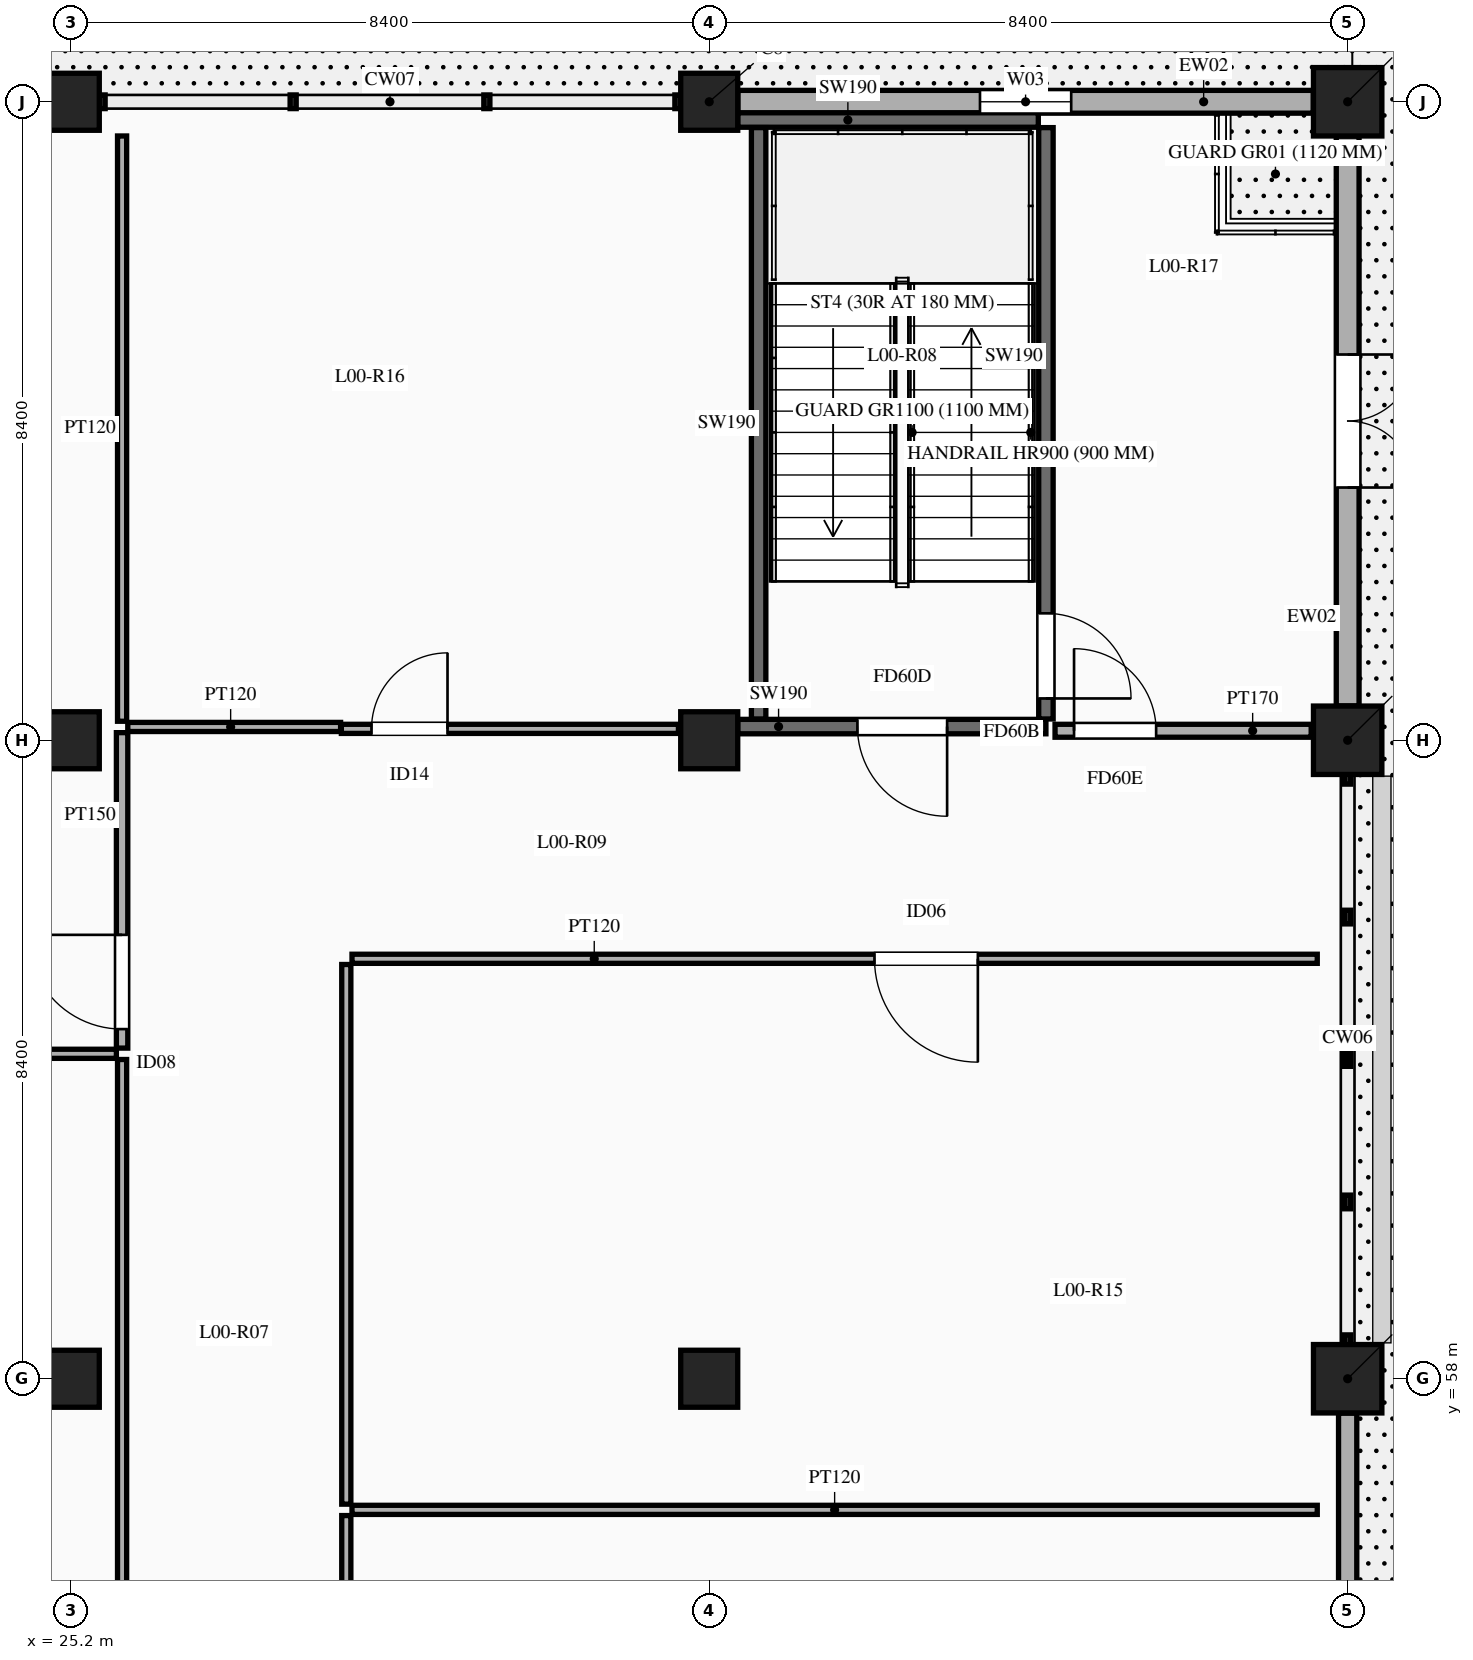
"""IFC4 building model, lengths in metres.
Left out: names, types, materials, properties, quantities, classifications, styles, units other than length and angle.
Written with IfcOpenShell. Run it as: python <this file> out.ifc"""

import sys

from ifc_helpers import new_model, si_unit, direction, frame, frame_2d, origin, origin_2d, place, context, subcontext, project, spatial, rectangle, circle, extrude, element, fill, save


model = new_model("IFC4")
c1 = context("Model", 3, precision=1e-05, world=origin(), true_north=direction((0.0, 1.0)))
c2 = subcontext(c1, "Body", "Model", "MODEL_VIEW")
j1 = project(units=[si_unit("LENGTHUNIT", "METRE"), si_unit("PLANEANGLEUNIT", "RADIAN")], contexts=[c1])
p1 = place(None, origin())
s1 = spatial("IfcSite", under=j1, at=p1, CompositionType="ELEMENT")
p2 = place(p1, origin())
s2 = spatial("IfcBuilding", under=s1, at=p2, CompositionType="ELEMENT")
p3 = place(p2, origin())
s3 = spatial("IfcBuildingStorey", under=s2, at=p3, CompositionType="ELEMENT", Elevation=0.0)
for number, where, z_axis, x_axis in (
    (1, (25.2, 58.0, 0.0), (0.0, 0.0, 1.0), (1.0, 0.0, 0.0)),
    (2, (25.2, 66.4, 0.0), (0.0, 0.0, 1.0), (1.0, 0.0, 0.0)),
    (3, (25.2, 74.8, 0.0), (0.0, 0.0, 1.0), (1.0, 0.0, 0.0)),
    (4, (33.6, 58.0, 0.0), (0.0, 0.0, 1.0), (1.0, 0.0, 0.0)),
    (5, (33.6, 66.4, 0.0), (0.0, 0.0, 1.0), (1.0, 0.0, 0.0)),
    (6, (33.6, 74.8, 0.0), (0.0, 0.0, 1.0), (1.0, 0.0, 0.0)),
):
    element("IfcColumn", number, at=place(p3, frame(where, z_axis=z_axis, x_axis=x_axis)), inside=s3, PredefinedType="COLUMN", context=c2, shape_type="SweptSolid", body=[
        extrude(rectangle(XDim=0.75, YDim=0.75, at=origin_2d()), origin(), (0.0, 0.0, 1.0), 5.4),
    ])
for number, where, z_axis, x_axis in (
    (7, (42.0, 58.0, 0.0), (0.0, 0.0, 1.0), (1.0, 0.0, 0.0)),
    (8, (42.0, 66.4, 0.0), (0.0, 0.0, 1.0), (1.0, 0.0, 0.0)),
    (9, (42.0, 74.8, 0.0), (0.0, 0.0, 1.0), (1.0, 0.0, 0.0)),
):
    element("IfcColumn", number, at=place(p3, frame(where, z_axis=z_axis, x_axis=x_axis)), inside=s3, PredefinedType="COLUMN", context=c2, shape_type="SweptSolid", body=[
        extrude(circle(Radius=0.45, at=origin_2d()), origin(), (0.0, 0.0, 1.0), 5.4),
    ])
p4 = place(p3, frame((33.977, 74.8, 0.0), z_axis=(0.0, 0.0, 1.0), x_axis=(1.0, 0.0, 0.0)))
e10 = element("IfcWall", 10, at=p4, inside=s3, PredefinedType="SOLIDWALL", context=c2, shape_type="SweptSolid", body=[
    extrude(rectangle(XDim=7.571, YDim=0.3, at=frame_2d((3.786, 0.0))), origin(), (0.0, 0.0, 1.0), 4.45),
])
p5 = place(p4, frame((3.186, 0.0, 1.1)))
e11 = element("IfcOpeningElement", 11, at=p5, cuts=e10, PredefinedType="OPENING", context=c2, shape_type="SweptSolid", body=[
    extrude(rectangle(XDim=1.2, YDim=1.2, at=frame_2d((0.6, 0.6))), frame((0.0, 0.16, 0.0), z_axis=(0.0, -1.0, 0.0), x_axis=(1.0, 0.0, 0.0)), (0.0, 0.0, 1.0), 0.32),
])
p6 = place(p3, frame((42.0, 50.052, 0.0), z_axis=(0.0, 0.0, 1.0), x_axis=(0.0, 1.0, 0.0)))
e12 = element("IfcWall", 12, at=p6, inside=s3, PredefinedType="SOLIDWALL", context=c2, shape_type="SweptSolid", body=[
    extrude(rectangle(XDim=7.496, YDim=0.24, at=frame_2d((3.748, 0.0))), origin(), (0.0, 0.0, 1.0), 4.45),
])
p7 = place(p6, frame((2.723, 0.0, 0.0)))
e13 = element("IfcOpeningElement", 13, at=p7, cuts=e12, PredefinedType="OPENING", context=c2, shape_type="SweptSolid", body=[
    extrude(rectangle(XDim=2.05, YDim=2.4, at=frame_2d((1.025, 1.2))), frame((0.0, 0.13, 0.0), z_axis=(0.0, -1.0, 0.0), x_axis=(1.0, 0.0, 0.0)), (0.0, 0.0, 1.0), 0.26),
])
p8 = place(p3, frame((42.0, 66.852, 0.0), z_axis=(0.0, 0.0, 1.0), x_axis=(0.0, 1.0, 0.0)))
e14 = element("IfcWall", 14, at=p8, inside=s3, PredefinedType="SOLIDWALL", context=c2, shape_type="SweptSolid", body=[
    extrude(rectangle(XDim=7.496, YDim=0.3, at=frame_2d((3.748, 0.0))), origin(), (0.0, 0.0, 1.0), 4.45),
])
p9 = place(p8, frame((2.873, 0.0, 0.0)))
e15 = element("IfcOpeningElement", 15, at=p9, cuts=e14, PredefinedType="OPENING", context=c2, shape_type="SweptSolid", body=[
    extrude(rectangle(XDim=1.75, YDim=2.35, at=frame_2d((0.875, 1.175))), frame((0.0, 0.16, 0.0), z_axis=(0.0, -1.0, 0.0), x_axis=(1.0, 0.0, 0.0)), (0.0, 0.0, 1.0), 0.32),
])
p10 = place(p3, frame((33.975, 66.58, 0.0), z_axis=(0.0, 0.0, 1.0), x_axis=(1.0, 0.0, 0.0)))
e16 = element("IfcWall", 16, at=p10, inside=s3, PredefinedType="SOLIDWALL", context=c2, shape_type="SweptSolid", body=[
    extrude(rectangle(XDim=4.055, YDim=0.19, at=frame_2d((2.027, 0.0))), origin(), (0.0, 0.0, 1.0), 5.2),
])
p11 = place(p10, frame((1.575, 0.0, 0.0)))
e17 = element("IfcOpeningElement", 17, at=p11, cuts=e16, PredefinedType="OPENING", context=c2, shape_type="SweptSolid", body=[
    extrude(rectangle(XDim=1.18, YDim=2.15, at=frame_2d((0.59, 1.075))), frame((0.0, 0.105, 0.0), z_axis=(0.0, -1.0, 0.0), x_axis=(1.0, 0.0, 0.0)), (0.0, 0.0, 1.0), 0.21),
])
p12 = place(p3, frame((33.975, 74.56, 0.0), z_axis=(0.0, 0.0, 1.0), x_axis=(1.0, 0.0, 0.0)))
e18 = element("IfcWall", 18, at=p12, inside=s3, PredefinedType="SOLIDWALL", context=c2, shape_type="SweptSolid", body=[
    extrude(rectangle(XDim=3.955, YDim=0.19, at=frame_2d((1.978, 0.0))), origin(), (0.0, 0.0, 1.0), 5.2),
])
p13 = place(p3, frame((34.25, 66.68, 0.0), z_axis=(0.0, 0.0, 1.0), x_axis=(0.0, 1.0, 0.0)))
e19 = element("IfcWall", 19, at=p13, inside=s3, PredefinedType="SOLIDWALL", context=c2, shape_type="SweptSolid", body=[
    extrude(rectangle(XDim=7.78, YDim=0.19, at=frame_2d((3.89, 0.0))), origin(), (0.0, 0.0, 1.0), 5.2),
])
p14 = place(p3, frame((38.03, 66.68, 0.0), z_axis=(0.0, 0.0, 1.0), x_axis=(0.0, 1.0, 0.0)))
e20 = element("IfcWall", 20, at=p14, inside=s3, PredefinedType="SOLIDWALL", context=c2, shape_type="SweptSolid", body=[
    extrude(rectangle(XDim=7.78, YDim=0.19, at=frame_2d((3.89, 0.0))), origin(), (0.0, 0.0, 1.0), 5.2),
])
p15 = place(p14, frame((0.27, 0.0, 0.0)))
e21 = element("IfcOpeningElement", 21, at=p15, cuts=e20, PredefinedType="OPENING", context=c2, shape_type="SweptSolid", body=[
    extrude(rectangle(XDim=1.12, YDim=2.15, at=frame_2d((0.56, 1.075))), frame((0.0, 0.105, 0.0), z_axis=(0.0, -1.0, 0.0), x_axis=(1.0, 0.0, 0.0)), (0.0, 0.0, 1.0), 0.21),
])
p16 = place(p3, frame((25.875, 42.55, 0.0), z_axis=(0.0, 0.0, 1.0), x_axis=(0.0, 1.0, 0.0)))
e22 = element("IfcWall", 22, at=p16, inside=s3, PredefinedType="PARTITIONING", context=c2, shape_type="SweptSolid", body=[
    extrude(rectangle(XDim=19.65, YDim=0.12, at=frame_2d((9.825, 0.0))), origin(), (0.0, 0.0, 1.0), 4.35),
])
p17 = place(p16, frame((10.45, 0.0, 0.0)))
e23 = element("IfcOpeningElement", 23, at=p17, cuts=e22, PredefinedType="OPENING", context=c2, shape_type="SweptSolid", body=[
    extrude(rectangle(XDim=1.6, YDim=2.35, at=frame_2d((0.8, 1.175))), frame((0.0, 0.07, 0.0), z_axis=(0.0, -1.0, 0.0), x_axis=(1.0, 0.0, 0.0)), (0.0, 0.0, 1.0), 0.14),
])
p18 = place(p3, frame((25.875, 62.35, 0.0), z_axis=(0.0, 0.0, 1.0), x_axis=(0.0, 1.0, 0.0)))
e24 = element("IfcWall", 24, at=p18, inside=s3, PredefinedType="PARTITIONING", context=c2, shape_type="SweptSolid", body=[
    extrude(rectangle(XDim=4.15, YDim=0.15, at=frame_2d((2.075, 0.0))), origin(), (0.0, 0.0, 1.0), 4.35),
])
p19 = place(p18, frame((0.25, 0.0, 0.0)))
e25 = element("IfcOpeningElement", 25, at=p19, cuts=e24, PredefinedType="OPENING", context=c2, shape_type="SweptSolid", body=[
    extrude(rectangle(XDim=1.24, YDim=2.2, at=frame_2d((0.62, 1.1))), frame((0.0, 0.085, 0.0), z_axis=(0.0, -1.0, 0.0), x_axis=(1.0, 0.0, 0.0)), (0.0, 0.0, 1.0), 0.17),
])
p20 = place(p3, frame((28.825, 34.3, 0.0), z_axis=(0.0, 0.0, 1.0), x_axis=(0.0, 1.0, 0.0)))
e26 = element("IfcWall", 26, at=p20, inside=s3, PredefinedType="PARTITIONING", context=c2, shape_type="SweptSolid", body=[
    extrude(rectangle(XDim=21.9, YDim=0.12, at=frame_2d((10.95, 0.0))), origin(), (0.0, 0.0, 1.0), 4.35),
])
p21 = place(p20, frame((10.27, 0.0, 0.0)))
e27 = element("IfcOpeningElement", 27, at=p21, cuts=e26, PredefinedType="OPENING", context=c2, shape_type="SweptSolid", body=[
    extrude(rectangle(XDim=1.36, YDim=2.3, at=frame_2d((0.68, 1.15))), frame((0.0, 0.07, 0.0), z_axis=(0.0, -1.0, 0.0), x_axis=(1.0, 0.0, 0.0)), (0.0, 0.0, 1.0), 0.14),
])
p22 = place(p3, frame((28.825, 56.35, 0.0), z_axis=(0.0, 0.0, 1.0), x_axis=(0.0, 1.0, 0.0)))
e28 = element("IfcWall", 28, at=p22, inside=s3, PredefinedType="PARTITIONING", context=c2, shape_type="SweptSolid", body=[
    extrude(rectangle(XDim=7.1, YDim=0.12, at=frame_2d((3.55, 0.0))), origin(), (0.0, 0.0, 1.0), 4.35),
])
p23 = place(p3, frame((25.95, 66.575, 0.0), z_axis=(0.0, 0.0, 1.0), x_axis=(1.0, 0.0, 0.0)))
e29 = element("IfcWall", 29, at=p23, inside=s3, PredefinedType="PARTITIONING", context=c2, shape_type="SweptSolid", body=[
    extrude(rectangle(XDim=2.8, YDim=0.12, at=frame_2d((1.4, 0.0))), origin(), (0.0, 0.0, 1.0), 4.35),
])
p24 = place(p3, frame((28.9, 63.525, 0.0), z_axis=(0.0, 0.0, 1.0), x_axis=(1.0, 0.0, 0.0)))
e30 = element("IfcWall", 30, at=p24, inside=s3, PredefinedType="PARTITIONING", context=c2, shape_type="SweptSolid", body=[
    extrude(rectangle(XDim=12.7, YDim=0.12, at=frame_2d((6.35, 0.0))), origin(), (0.0, 0.0, 1.0), 4.35),
])
p25 = place(p24, frame((6.875, 0.0, 0.0)))
e31 = element("IfcOpeningElement", 31, at=p25, cuts=e30, PredefinedType="OPENING", context=c2, shape_type="SweptSolid", body=[
    extrude(rectangle(XDim=1.36, YDim=2.3, at=frame_2d((0.68, 1.15))), frame((0.0, 0.07, 0.0), z_axis=(0.0, -1.0, 0.0), x_axis=(1.0, 0.0, 0.0)), (0.0, 0.0, 1.0), 0.14),
])
p26 = place(p3, frame((28.76, 66.55, 0.0), z_axis=(0.0, 0.0, 1.0), x_axis=(1.0, 0.0, 0.0)))
e32 = element("IfcWall", 32, at=p26, inside=s3, PredefinedType="PARTITIONING", context=c2, shape_type="SweptSolid", body=[
    extrude(rectangle(XDim=4.435, YDim=0.12, at=frame_2d((2.218, 0.0))), origin(), (0.0, 0.0, 1.0), 4.35),
])
p27 = place(p26, frame((0.397, 0.0, 0.0)))
e33 = element("IfcOpeningElement", 33, at=p27, cuts=e32, PredefinedType="OPENING", context=c2, shape_type="SweptSolid", body=[
    extrude(rectangle(XDim=1.0, YDim=2.15, at=frame_2d((0.5, 1.075))), frame((0.0, 0.07, 0.0), z_axis=(0.0, -1.0, 0.0), x_axis=(1.0, 0.0, 0.0)), (0.0, 0.0, 1.0), 0.14),
])
p28 = place(p3, frame((38.15, 66.525, 0.0), z_axis=(0.0, 0.0, 1.0), x_axis=(1.0, 0.0, 0.0)))
e34 = element("IfcWall", 34, at=p28, inside=s3, PredefinedType="PARTITIONING", context=c2, shape_type="SweptSolid", body=[
    extrude(rectangle(XDim=3.37, YDim=0.17, at=frame_2d((1.685, 0.0))), origin(), (0.0, 0.0, 1.0), 4.35),
])
p29 = place(p28, frame((0.25, 0.0, 0.0)))
e35 = element("IfcOpeningElement", 35, at=p29, cuts=e34, PredefinedType="OPENING", context=c2, shape_type="SweptSolid", body=[
    extrude(rectangle(XDim=1.08, YDim=2.15, at=frame_2d((0.54, 1.075))), frame((0.0, 0.095, 0.0), z_axis=(0.0, -1.0, 0.0), x_axis=(1.0, 0.0, 0.0)), (0.0, 0.0, 1.0), 0.19),
])
p30 = place(p3, frame((8.85, 62.275, 0.0), z_axis=(0.0, 0.0, 1.0), x_axis=(1.0, 0.0, 0.0)))
e36 = element("IfcWall", 36, at=p30, inside=s3, PredefinedType="PARTITIONING", context=c2, shape_type="SweptSolid", body=[
    extrude(rectangle(XDim=16.95, YDim=0.12, at=frame_2d((8.475, 0.0))), origin(), (0.0, 0.0, 1.0), 4.35),
])
p31 = place(p3, frame((25.875, 66.65, 0.0), z_axis=(0.0, 0.0, 1.0), x_axis=(0.0, 1.0, 0.0)))
e37 = element("IfcWall", 37, at=p31, inside=s3, PredefinedType="PARTITIONING", context=c2, shape_type="SweptSolid", body=[
    extrude(rectangle(XDim=7.7, YDim=0.12, at=frame_2d((3.85, 0.0))), origin(), (0.0, 0.0, 1.0), 4.35),
])
p32 = place(p3, frame((28.9, 56.275, 0.0), z_axis=(0.0, 0.0, 1.0), x_axis=(1.0, 0.0, 0.0)))
e38 = element("IfcWall", 38, at=p32, inside=s3, PredefinedType="PARTITIONING", context=c2, shape_type="SweptSolid", body=[
    extrude(rectangle(XDim=12.7, YDim=0.12, at=frame_2d((6.35, 0.0))), origin(), (0.0, 0.0, 1.0), 4.35),
])
p33 = place(p5, origin())
e39 = element("IfcWindow", 39, at=p33, inside=s3, PartitioningType="SINGLE_PANEL", PredefinedType="WINDOW", context=c2, shape_type="SweptSolid", body=[
    extrude(rectangle(XDim=1.2, YDim=1.2, at=frame_2d((0.6, 0.6))), frame((0.0, 0.03, 0.0), z_axis=(0.0, -1.0, 0.0), x_axis=(1.0, 0.0, 0.0)), (0.0, 0.0, 1.0), 0.06),
])
fill(e11, e39)
p34 = place(p9, frame((1.75, 0.0, 0.0), z_axis=(0.0, 0.0, 1.0), x_axis=(-1.0, 0.0, 0.0)))
e40 = element("IfcDoor", 40, at=p34, inside=s3, OperationType="DOUBLE_DOOR_SINGLE_SWING", PredefinedType="DOOR", context=c2, shape_type="SweptSolid", body=[
    extrude(rectangle(XDim=1.75, YDim=2.35, at=frame_2d((0.875, 1.175))), frame((0.0, 0.025, 0.0), z_axis=(0.0, -1.0, 0.0), x_axis=(1.0, 0.0, 0.0)), (0.0, 0.0, 1.0), 0.05),
])
fill(e15, e40)
p35 = place(p15, frame((1.12, 0.0, 0.0), z_axis=(0.0, 0.0, 1.0), x_axis=(-1.0, 0.0, 0.0)))
e41 = element("IfcDoor", 41, at=p35, inside=s3, OperationType="SINGLE_SWING_RIGHT", PredefinedType="DOOR", context=c2, shape_type="SweptSolid", body=[
    extrude(rectangle(XDim=1.12, YDim=2.15, at=frame_2d((0.56, 1.075))), frame((0.0, 0.025, 0.0), z_axis=(0.0, -1.0, 0.0), x_axis=(1.0, 0.0, 0.0)), (0.0, 0.0, 1.0), 0.05),
])
fill(e21, e41)
p36 = place(p11, frame((1.18, 0.0, 0.0), z_axis=(0.0, 0.0, 1.0), x_axis=(-1.0, 0.0, 0.0)))
e42 = element("IfcDoor", 42, at=p36, inside=s3, OperationType="SINGLE_SWING_LEFT", PredefinedType="DOOR", context=c2, shape_type="SweptSolid", body=[
    extrude(rectangle(XDim=1.18, YDim=2.15, at=frame_2d((0.59, 1.075))), frame((0.0, 0.025, 0.0), z_axis=(0.0, -1.0, 0.0), x_axis=(1.0, 0.0, 0.0)), (0.0, 0.0, 1.0), 0.05),
])
fill(e17, e42)
p37 = place(p19, origin())
e43 = element("IfcDoor", 43, at=p37, inside=s3, OperationType="SINGLE_SWING_RIGHT", PredefinedType="DOOR", context=c2, shape_type="SweptSolid", body=[
    extrude(rectangle(XDim=1.24, YDim=2.2, at=frame_2d((0.62, 1.1))), frame((0.0, 0.025, 0.0), z_axis=(0.0, -1.0, 0.0), x_axis=(1.0, 0.0, 0.0)), (0.0, 0.0, 1.0), 0.05),
])
fill(e25, e43)
p38 = place(p25, frame((1.36, 0.0, 0.0), z_axis=(0.0, 0.0, 1.0), x_axis=(-1.0, 0.0, 0.0)))
e44 = element("IfcDoor", 44, at=p38, inside=s3, OperationType="SINGLE_SWING_LEFT", PredefinedType="DOOR", context=c2, shape_type="SweptSolid", body=[
    extrude(rectangle(XDim=1.36, YDim=2.3, at=frame_2d((0.68, 1.15))), frame((0.0, 0.025, 0.0), z_axis=(0.0, -1.0, 0.0), x_axis=(1.0, 0.0, 0.0)), (0.0, 0.0, 1.0), 0.05),
])
fill(e31, e44)
p39 = place(p27, origin())
e45 = element("IfcDoor", 45, at=p39, inside=s3, OperationType="SINGLE_SWING_RIGHT", PredefinedType="DOOR", context=c2, shape_type="SweptSolid", body=[
    extrude(rectangle(XDim=1.0, YDim=2.15, at=frame_2d((0.5, 1.075))), frame((0.0, 0.025, 0.0), z_axis=(0.0, -1.0, 0.0), x_axis=(1.0, 0.0, 0.0)), (0.0, 0.0, 1.0), 0.05),
])
fill(e33, e45)
p40 = place(p29, origin())
e46 = element("IfcDoor", 46, at=p40, inside=s3, OperationType="SINGLE_SWING_LEFT", PredefinedType="DOOR", context=c2, shape_type="SweptSolid", body=[
    extrude(rectangle(XDim=1.08, YDim=2.15, at=frame_2d((0.54, 1.075))), frame((0.0, 0.025, 0.0), z_axis=(0.0, -1.0, 0.0), x_axis=(1.0, 0.0, 0.0)), (0.0, 0.0, 1.0), 0.05),
])
fill(e35, e46)
save(model, sys.argv[1])
